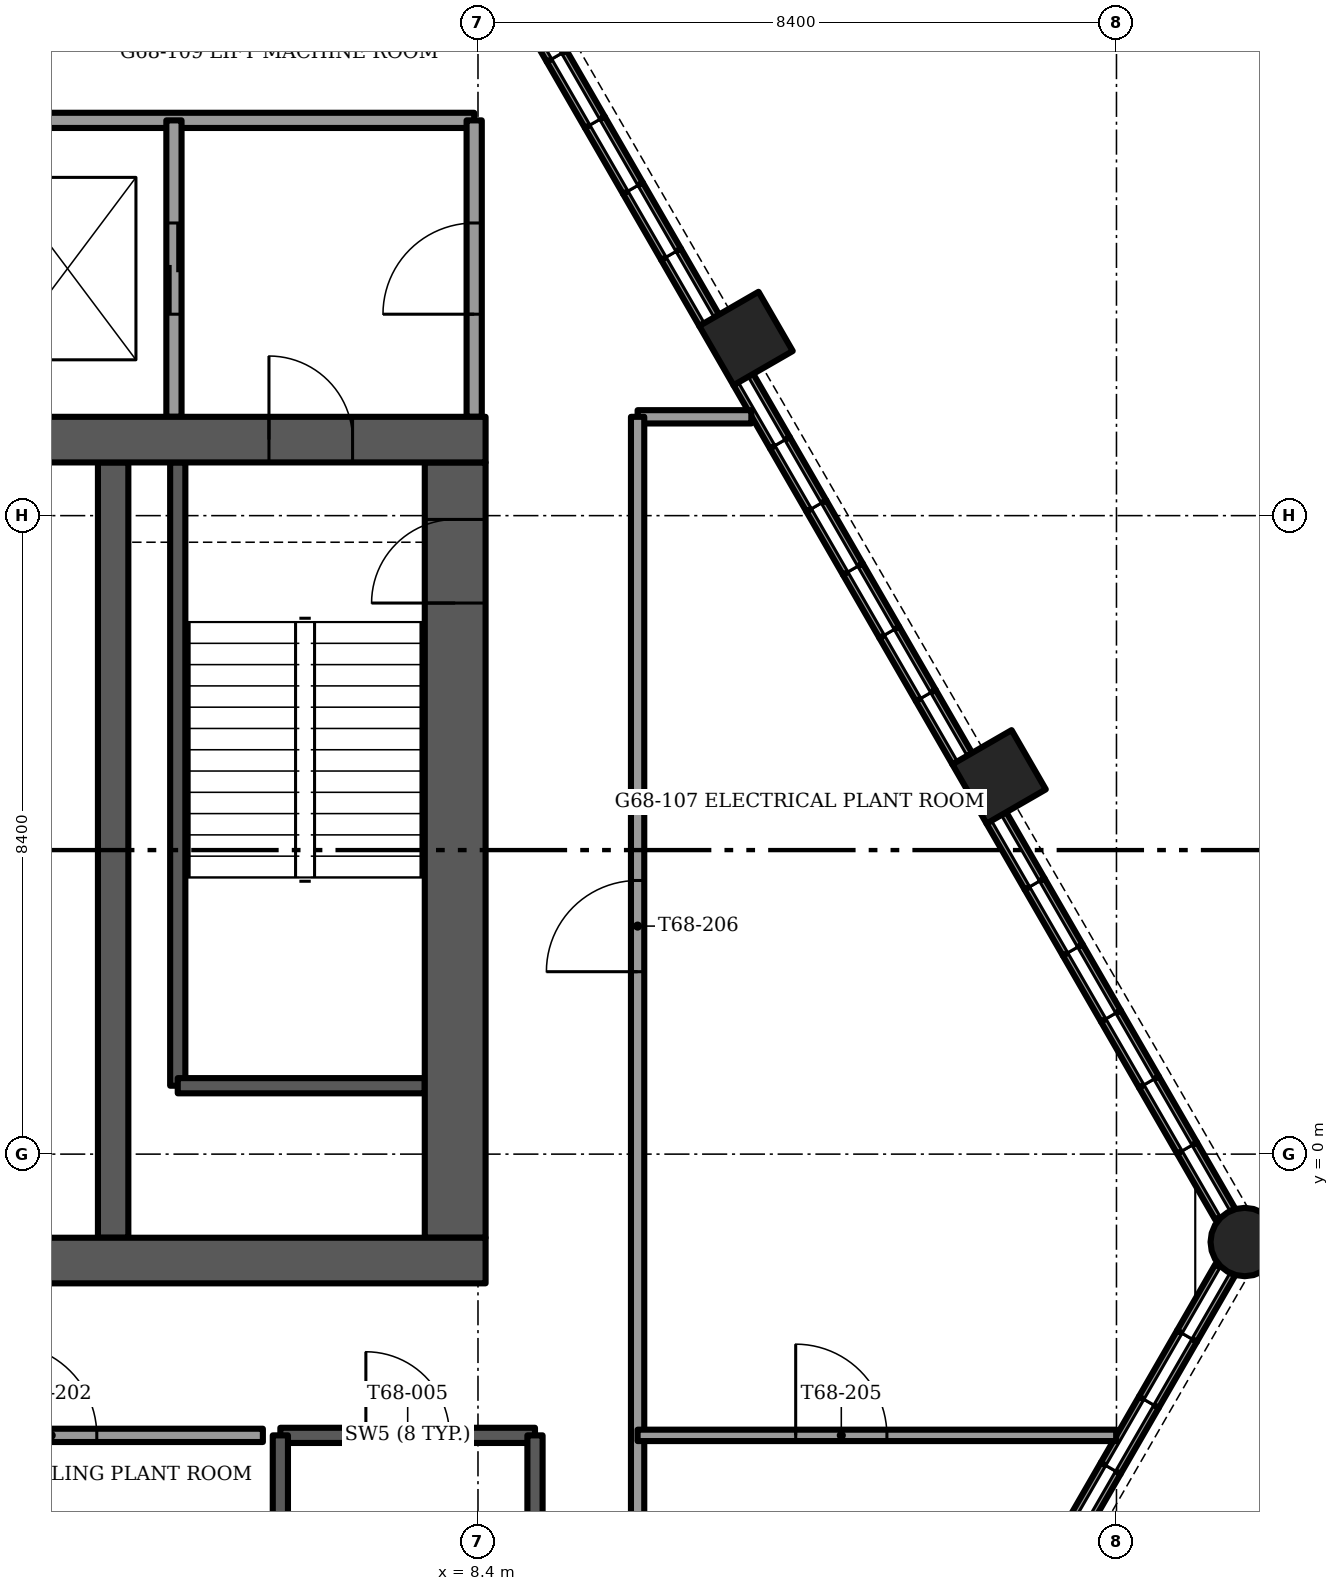
"""IFC4 building model, lengths in metres.
Left out: names, types, materials, properties, quantities, classifications, styles, units other than length and angle.
Written with IfcOpenShell. Run it as: python <this file> out.ifc"""

import sys

from ifc_helpers import new_model, si_unit, direction, frame, frame_2d, origin, origin_2d, place, context, subcontext, project, spatial, rectangle, circle, extrude, element, fill, save


model = new_model("IFC4")
c1 = context("Model", 3, precision=1e-05, world=origin(), true_north=direction((0.0, 1.0)))
c2 = subcontext(c1, "Body", "Model", "MODEL_VIEW")
j1 = project(units=[si_unit("LENGTHUNIT", "METRE"), si_unit("PLANEANGLEUNIT", "RADIAN")], contexts=[c1])
p1 = place(None, origin())
s1 = spatial("IfcSite", under=j1, at=p1, CompositionType="ELEMENT")
p2 = place(p1, origin())
s2 = spatial("IfcBuilding", under=s1, at=p2, CompositionType="ELEMENT")
p3 = place(p2, frame((0.0, 0.0, 275.0)))
s3 = spatial("IfcBuildingStorey", under=s2, at=p3, CompositionType="ELEMENT", Elevation=275.0)
p4 = place(p3, frame((-8.5, -1.4, -0.3), z_axis=(0.0, 0.0, 1.0), x_axis=(1.0, 0.0, 0.0)))
e1 = element("IfcWall", 1, at=p4, inside=s3, PredefinedType="SHEAR", context=c2, shape_type="SweptSolid", body=[
    extrude(rectangle(XDim=17.0, YDim=0.6, at=frame_2d((8.5, 0.0))), origin(), (0.0, 0.0, 1.0), 4.5),
])
p5 = place(p3, frame((-8.5, 9.4, -0.3), z_axis=(0.0, 0.0, 1.0), x_axis=(1.0, 0.0, 0.0)))
e2 = element("IfcWall", 2, at=p5, inside=s3, PredefinedType="SHEAR", context=c2, shape_type="SweptSolid", body=[
    extrude(rectangle(XDim=17.0, YDim=0.6, at=frame_2d((8.5, 0.0))), origin(), (0.0, 0.0, 1.0), 4.5),
])
p6 = place(p5, frame((1.75, 0.0, 0.0)))
e3 = element("IfcOpeningElement", 3, at=p6, cuts=e2, PredefinedType="OPENING", context=c2, shape_type="SweptSolid", body=[
    extrude(rectangle(XDim=1.1, YDim=2.1, at=frame_2d((0.55, 1.05))), frame((0.0, 0.3, 0.0), z_axis=(0.0, -1.0, 0.0), x_axis=(1.0, 0.0, 0.0)), (0.0, 0.0, 1.0), 0.6),
])
p7 = place(p5, frame((14.15, 0.0, 0.0)))
e4 = element("IfcOpeningElement", 4, at=p7, cuts=e2, PredefinedType="OPENING", context=c2, shape_type="SweptSolid", body=[
    extrude(rectangle(XDim=1.1, YDim=2.1, at=frame_2d((0.55, 1.05))), frame((0.0, 0.3, 0.0), z_axis=(0.0, -1.0, 0.0), x_axis=(1.0, 0.0, 0.0)), (0.0, 0.0, 1.0), 0.6),
])
p8 = place(p3, frame((8.1, -1.1, -0.3), z_axis=(0.0, 0.0, 1.0), x_axis=(0.0, 1.0, 0.0)))
e5 = element("IfcWall", 5, at=p8, inside=s3, PredefinedType="SHEAR", context=c2, shape_type="SweptSolid", body=[
    extrude(rectangle(XDim=10.2, YDim=0.8, at=frame_2d((5.1, 0.0))), origin(), (0.0, 0.0, 1.0), 4.5),
])
p9 = place(p8, frame((8.35, 0.0, 0.0)))
e6 = element("IfcOpeningElement", 6, at=p9, cuts=e5, PredefinedType="OPENING", context=c2, shape_type="SweptSolid", body=[
    extrude(rectangle(XDim=1.1, YDim=2.1, at=frame_2d((0.55, 1.05))), frame((0.0, 0.4, 0.0), z_axis=(0.0, -1.0, 0.0), x_axis=(1.0, 0.0, 0.0)), (0.0, 0.0, 1.0), 0.8),
])
p10 = place(p3, frame((3.6, -1.1, -0.3), z_axis=(0.0, 0.0, 1.0), x_axis=(0.0, 1.0, 0.0)))
e7 = element("IfcWall", 7, at=p10, inside=s3, PredefinedType="SHEAR", context=c2, shape_type="SweptSolid", body=[
    extrude(rectangle(XDim=10.2, YDim=0.4, at=frame_2d((5.1, 0.0))), origin(), (0.0, 0.0, 1.0), 4.5),
])
p11 = place(p3, frame((18.487, -1.156, -1.2), z_axis=(0.0, 0.0, 1.0), x_axis=(1.0, 0.0, 0.0)))
e8 = element("IfcColumn", 8, at=p11, inside=s3, PredefinedType="COLUMN", context=c2, shape_type="SweptSolid", body=[
    extrude(circle(Radius=0.45, at=origin_2d()), origin(), (0.0, 0.0, 1.0), 4.5),
])
for number, where, z_axis, x_axis in (
    (9, (15.256, 4.963, -1.2), (0.0, 0.0, 1.0), (0.5, -0.866, 0.0)),
    (10, (11.926, 10.73, -1.2), (0.0, 0.0, 1.0), (0.5, -0.866, 0.0)),
):
    element("IfcColumn", number, at=place(p3, frame(where, z_axis=z_axis, x_axis=x_axis)), inside=s3, PredefinedType="COLUMN", context=c2, shape_type="SweptSolid", body=[
        extrude(rectangle(XDim=0.9, YDim=0.9, at=origin_2d()), origin(), (0.0, 0.0, 1.0), 4.5),
    ])
p12 = place(p3, frame((16.222, -5.002, 0.0), z_axis=(0.0, 0.0, 1.0), x_axis=(0.500115484592, 0.865958718457, 0.0)))
e11 = element("IfcWall", 11, at=p12, inside=s3, PredefinedType="SOLIDWALL", context=c2, shape_type="SweptSolid", body=[
    extrude(rectangle(XDim=1.004, YDim=0.3, at=frame_2d((0.502, 0.0))), origin(), (0.0, 0.0, 1.0), 1.0),
])
p13 = place(p3, frame((16.724, -4.133, 0.0), z_axis=(0.0, 0.0, 1.0), x_axis=(0.499904868165, 0.866080321209, 0.0)))
e12 = element("IfcWall", 12, at=p13, inside=s3, PredefinedType="SOLIDWALL", context=c2, shape_type="SweptSolid", body=[
    extrude(rectangle(XDim=1.004, YDim=0.3, at=frame_2d((0.502, 0.0))), origin(), (0.0, 0.0, 1.0), 1.0),
])
p14 = place(p3, frame((17.226, -3.263, 0.0), z_axis=(0.0, 0.0, 1.0), x_axis=(0.499933044277, 0.866064057238, 0.0)))
e13 = element("IfcWall", 13, at=p14, inside=s3, PredefinedType="SOLIDWALL", context=c2, shape_type="SweptSolid", body=[
    extrude(rectangle(XDim=1.004, YDim=0.3, at=frame_2d((0.502, 0.0))), origin(), (0.0, 0.0, 1.0), 1.0),
])
p15 = place(p3, frame((17.728, -2.394, 0.0), z_axis=(0.0, 0.0, 1.0), x_axis=(0.500010157896, 0.866019539041, 0.0)))
e14 = element("IfcWall", 14, at=p15, inside=s3, PredefinedType="SOLIDWALL", context=c2, shape_type="SweptSolid", body=[
    extrude(rectangle(XDim=1.004, YDim=0.3, at=frame_2d((0.502, 0.0))), origin(), (0.0, 0.0, 1.0), 1.0),
])
for number, where, z_axis, x_axis in (
    (15, (18.23, -0.788, 0.0), (0.0, 0.0, 1.0), (-0.5, 0.866, 0.0)),
    (16, (17.729, 0.08, 0.0), (0.0, 0.0, 1.0), (-0.5, 0.866, 0.0)),
    (17, (17.227, 0.949, 0.0), (0.0, 0.0, 1.0), (-0.5, 0.866, 0.0)),
    (18, (16.726, 1.818, 0.0), (0.0, 0.0, 1.0), (-0.5, 0.866, 0.0)),
):
    element("IfcWall", number, at=place(p3, frame(where, z_axis=z_axis, x_axis=x_axis)), inside=s3, PredefinedType="SOLIDWALL", context=c2, shape_type="SweptSolid", body=[
        extrude(rectangle(XDim=1.003, YDim=0.3, at=frame_2d((0.501, 0.0))), origin(), (0.0, 0.0, 1.0), 1.0),
    ])
p16 = place(p3, frame((16.224, 2.686, 0.0), z_axis=(0.0, 0.0, 1.0), x_axis=(-0.500143783026, 0.865942374699, 0.0)))
e19 = element("IfcWall", 19, at=p16, inside=s3, PredefinedType="SOLIDWALL", context=c2, shape_type="SweptSolid", body=[
    extrude(rectangle(XDim=1.003, YDim=0.3, at=frame_2d((0.501, 0.0))), origin(), (0.0, 0.0, 1.0), 1.0),
])
p17 = place(p3, frame((15.722, 3.555, 0.0), z_axis=(0.0, 0.0, 1.0), x_axis=(-0.499961250474, 0.866047774678, 0.0)))
e20 = element("IfcWall", 20, at=p17, inside=s3, PredefinedType="SOLIDWALL", context=c2, shape_type="SweptSolid", body=[
    extrude(rectangle(XDim=1.003, YDim=0.3, at=frame_2d((0.501, 0.0))), origin(), (0.0, 0.0, 1.0), 1.0),
])
p18 = place(p3, frame((14.771, 5.203, 0.0), z_axis=(0.0, 0.0, 1.0), x_axis=(-0.500133489192, 0.865948320045, 0.0)))
e21 = element("IfcWall", 21, at=p18, inside=s3, PredefinedType="SOLIDWALL", context=c2, shape_type="SweptSolid", body=[
    extrude(rectangle(XDim=0.96, YDim=0.3, at=frame_2d((0.48, 0.0))), origin(), (0.0, 0.0, 1.0), 1.0),
])
p19 = place(p3, frame((14.291, 6.034, 0.0), z_axis=(0.0, 0.0, 1.0), x_axis=(-0.500023335103, 0.866011930837, 0.0)))
e22 = element("IfcWall", 22, at=p19, inside=s3, PredefinedType="SOLIDWALL", context=c2, shape_type="SweptSolid", body=[
    extrude(rectangle(XDim=0.96, YDim=0.3, at=frame_2d((0.48, 0.0))), origin(), (0.0, 0.0, 1.0), 1.0),
])
p20 = place(p3, frame((13.811, 6.865, 0.0), z_axis=(0.0, 0.0, 1.0), x_axis=(-0.499832553123, 0.866122057702, 0.0)))
e23 = element("IfcWall", 23, at=p20, inside=s3, PredefinedType="SOLIDWALL", context=c2, shape_type="SweptSolid", body=[
    extrude(rectangle(XDim=0.96, YDim=0.3, at=frame_2d((0.48, 0.0))), origin(), (0.0, 0.0, 1.0), 1.0),
])
p21 = place(p3, frame((13.331, 7.697, 0.0), z_axis=(0.0, 0.0, 1.0), x_axis=(-0.500023335103, 0.866011930837, 0.0)))
e24 = element("IfcWall", 24, at=p21, inside=s3, PredefinedType="SOLIDWALL", context=c2, shape_type="SweptSolid", body=[
    extrude(rectangle(XDim=0.96, YDim=0.3, at=frame_2d((0.48, 0.0))), origin(), (0.0, 0.0, 1.0), 1.0),
])
for number, where, z_axis, x_axis in (
    (25, (12.851, 8.528, 0.0), (0.0, 0.0, 1.0), (-0.5, 0.866, 0.0)),
    (26, (12.371, 9.359, 0.0), (0.0, 0.0, 1.0), (-0.5, 0.866, 0.0)),
):
    element("IfcWall", number, at=place(p3, frame(where, z_axis=z_axis, x_axis=x_axis)), inside=s3, PredefinedType="SOLIDWALL", context=c2, shape_type="SweptSolid", body=[
        extrude(rectangle(XDim=0.96, YDim=0.3, at=frame_2d((0.48, 0.0))), origin(), (0.0, 0.0, 1.0), 1.0),
    ])
for number, where, z_axis, x_axis in (
    (27, (11.441, 10.97, 0.0), (0.0, 0.0, 1.0), (-0.5, 0.866, 0.0)),
    (28, (10.94, 11.839, 0.0), (0.0, 0.0, 1.0), (-0.5, 0.866, 0.0)),
    (29, (10.438, 12.707, 0.0), (0.0, 0.0, 1.0), (-0.5, 0.866, 0.0)),
):
    element("IfcWall", number, at=place(p3, frame(where, z_axis=z_axis, x_axis=x_axis)), inside=s3, PredefinedType="SOLIDWALL", context=c2, shape_type="SweptSolid", body=[
        extrude(rectangle(XDim=1.003, YDim=0.3, at=frame_2d((0.501, 0.0))), origin(), (0.0, 0.0, 1.0), 1.0),
    ])
p22 = place(p3, frame((9.937, 13.576, 0.0), z_axis=(0.0, 0.0, 1.0), x_axis=(-0.499961250474, 0.866047774678, 0.0)))
e30 = element("IfcWall", 30, at=p22, inside=s3, PredefinedType="SOLIDWALL", context=c2, shape_type="SweptSolid", body=[
    extrude(rectangle(XDim=1.003, YDim=0.3, at=frame_2d((0.501, 0.0))), origin(), (0.0, 0.0, 1.0), 1.0),
])
p23 = place(p3, frame((9.435, 14.445, 0.0), z_axis=(0.0, 0.0, 1.0), x_axis=(-0.500038395149, 0.8660032352, 0.0)))
e31 = element("IfcWall", 31, at=p23, inside=s3, PredefinedType="SOLIDWALL", context=c2, shape_type="SweptSolid", body=[
    extrude(rectangle(XDim=1.003, YDim=0.3, at=frame_2d((0.502, 0.0))), origin(), (0.0, 0.0, 1.0), 1.0),
])
p24 = place(p3, frame((-10.5, -3.7, 0.0), z_axis=(0.0, 0.0, 1.0), x_axis=(1.0, 0.0, 0.0)))
e32 = element("IfcWall", 32, at=p24, inside=s3, PredefinedType="PARTITIONING", context=c2, shape_type="SweptSolid", body=[
    extrude(rectangle(XDim=16.07, YDim=0.175, at=frame_2d((8.035, 0.0))), origin(), (0.0, 0.0, 1.0), 4.2),
])
p25 = place(p24, frame((1.4, 0.0, 0.0)))
e33 = element("IfcOpeningElement", 33, at=p25, cuts=e32, PredefinedType="OPENING", context=c2, shape_type="SweptSolid", body=[
    extrude(rectangle(XDim=1.2, YDim=2.1, at=frame_2d((0.6, 1.05))), frame((0.0, 0.087, 0.0), z_axis=(0.0, -1.0, 0.0), x_axis=(1.0, 0.0, 0.0)), (0.0, 0.0, 1.0), 0.175),
])
p26 = place(p24, frame((6.65, 0.0, 0.0)))
e34 = element("IfcOpeningElement", 34, at=p26, cuts=e32, PredefinedType="OPENING", context=c2, shape_type="SweptSolid", body=[
    extrude(rectangle(XDim=1.2, YDim=2.1, at=frame_2d((0.6, 1.05))), frame((0.0, 0.087, 0.0), z_axis=(0.0, -1.0, 0.0), x_axis=(1.0, 0.0, 0.0)), (0.0, 0.0, 1.0), 0.175),
])
p27 = place(p24, frame((12.685, 0.0, 0.0)))
e35 = element("IfcOpeningElement", 35, at=p27, cuts=e32, PredefinedType="OPENING", context=c2, shape_type="SweptSolid", body=[
    extrude(rectangle(XDim=1.2, YDim=2.1, at=frame_2d((0.6, 1.05))), frame((0.0, 0.087, 0.0), z_axis=(0.0, -1.0, 0.0), x_axis=(1.0, 0.0, 0.0)), (0.0, 0.0, 1.0), 0.175),
])
p28 = place(p3, frame((10.5, 9.7, 0.0), z_axis=(0.0, 0.0, 1.0), x_axis=(1.0, 0.0, 0.0)))
e36 = element("IfcWall", 36, at=p28, inside=s3, PredefinedType="PARTITIONING", context=c2, shape_type="SweptSolid", body=[
    extrude(rectangle(XDim=1.496, YDim=0.175, at=frame_2d((0.748, 0.0))), origin(), (0.0, 0.0, 1.0), 4.2),
])
p29 = place(p3, frame((10.5, -11.454, 0.0), z_axis=(0.0, 0.0, 1.0), x_axis=(0.0, 1.0, 0.0)))
e37 = element("IfcWall", 37, at=p29, inside=s3, PredefinedType="PARTITIONING", context=c2, shape_type="SweptSolid", body=[
    extrude(rectangle(XDim=21.154, YDim=0.175, at=frame_2d((10.577, 0.0))), origin(), (0.0, 0.0, 1.0), 4.067),
])
p30 = place(p29, frame((13.854, 0.0, 0.0)))
e38 = element("IfcOpeningElement", 38, at=p30, cuts=e37, PredefinedType="OPENING", context=c2, shape_type="SweptSolid", body=[
    extrude(rectangle(XDim=1.2, YDim=2.1, at=frame_2d((0.6, 1.05))), frame((0.0, 0.087, 0.0), z_axis=(0.0, -1.0, 0.0), x_axis=(1.0, 0.0, 0.0)), (0.0, 0.0, 1.0), 0.175),
])
p31 = place(p3, frame((10.5, -3.7, 0.0), z_axis=(0.0, 0.0, 1.0), x_axis=(1.0, 0.0, 0.0)))
e39 = element("IfcWall", 39, at=p31, inside=s3, PredefinedType="PARTITIONING", context=c2, shape_type="SweptSolid", body=[
    extrude(rectangle(XDim=6.296, YDim=0.15, at=frame_2d((3.148, 0.0))), origin(), (0.0, 0.0, 1.0), 4.2),
])
p32 = place(p31, frame((2.08, 0.0, 0.0)))
e40 = element("IfcOpeningElement", 40, at=p32, cuts=e39, PredefinedType="OPENING", context=c2, shape_type="SweptSolid", body=[
    extrude(rectangle(XDim=1.2, YDim=2.1, at=frame_2d((0.6, 1.05))), frame((0.0, 0.075, 0.0), z_axis=(0.0, -1.0, 0.0), x_axis=(1.0, 0.0, 0.0)), (0.0, 0.0, 1.0), 0.15),
])
p33 = place(p3, frame((4.45, 0.9, -0.3), z_axis=(0.0, 0.0, 1.0), x_axis=(0.0, 1.0, 0.0)))
e41 = element("IfcWall", 41, at=p33, inside=s3, PredefinedType="SOLIDWALL", context=c2, shape_type="SweptSolid", body=[
    extrude(rectangle(XDim=8.2, YDim=0.2, at=frame_2d((4.1, 0.0))), origin(), (0.0, 0.0, 1.0), 4.5),
])
p34 = place(p3, frame((4.45, 0.9, -0.3), z_axis=(0.0, 0.0, 1.0), x_axis=(1.0, 0.0, 0.0)))
e42 = element("IfcWall", 42, at=p34, inside=s3, PredefinedType="SOLIDWALL", context=c2, shape_type="SweptSolid", body=[
    extrude(rectangle(XDim=3.25, YDim=0.2, at=frame_2d((1.625, 0.0))), origin(), (0.0, 0.0, 1.0), 4.5),
])
p35 = place(p3, frame((5.8, -3.7, -0.3), z_axis=(0.0, 0.0, 1.0), x_axis=(1.0, 0.0, 0.0)))
e43 = element("IfcWall", 43, at=p35, inside=s3, PredefinedType="SOLIDWALL", context=c2, shape_type="SweptSolid", body=[
    extrude(rectangle(XDim=3.35, YDim=0.2, at=frame_2d((1.675, 0.0))), origin(), (0.0, 0.0, 1.0), 4.5),
])
p36 = place(p35, frame((1.125, 0.0, 0.0)))
e44 = element("IfcOpeningElement", 44, at=p36, cuts=e43, PredefinedType="OPENING", context=c2, shape_type="SweptSolid", body=[
    extrude(rectangle(XDim=1.1, YDim=2.1, at=frame_2d((0.55, 1.05))), frame((0.0, 0.1, 0.0), z_axis=(0.0, -1.0, 0.0), x_axis=(1.0, 0.0, 0.0)), (0.0, 0.0, 1.0), 0.2),
])
for number, where, z_axis, x_axis in (
    (45, (5.8, -3.7, -0.3), (0.0, 0.0, 1.0), (0.0, -1.0, 0.0)),
    (46, (9.15, -3.7, -0.3), (0.0, 0.0, 1.0), (0.0, -1.0, 0.0)),
):
    element("IfcWall", number, at=place(p3, frame(where, z_axis=z_axis, x_axis=x_axis)), inside=s3, PredefinedType="SOLIDWALL", context=c2, shape_type="SweptSolid", body=[
        extrude(rectangle(XDim=7.7, YDim=0.2, at=frame_2d((3.85, 0.0))), origin(), (0.0, 0.0, 1.0), 4.5),
    ])
p37 = place(p3, frame((-8.35, 13.6, 0.0), z_axis=(0.0, 0.0, 1.0), x_axis=(1.0, 0.0, 0.0)))
e47 = element("IfcWall", 47, at=p37, inside=s3, PredefinedType="PARTITIONING", context=c2, shape_type="SweptSolid", body=[
    extrude(rectangle(XDim=16.7, YDim=0.2, at=frame_2d((8.35, 0.0))), origin(), (0.0, 0.0, 1.0), 4.2),
])
p38 = place(p3, frame((8.35, 9.7, 0.0), z_axis=(0.0, 0.0, 1.0), x_axis=(0.0, 1.0, 0.0)))
e48 = element("IfcWall", 48, at=p38, inside=s3, PredefinedType="PARTITIONING", context=c2, shape_type="SweptSolid", body=[
    extrude(rectangle(XDim=3.9, YDim=0.2, at=frame_2d((1.95, 0.0))), origin(), (0.0, 0.0, 1.0), 4.2),
])
p39 = place(p38, frame((1.35, 0.0, 0.0)))
e49 = element("IfcOpeningElement", 49, at=p39, cuts=e48, PredefinedType="OPENING", context=c2, shape_type="SweptSolid", body=[
    extrude(rectangle(XDim=1.2, YDim=2.1, at=frame_2d((0.6, 1.05))), frame((0.0, 0.1, 0.0), z_axis=(0.0, -1.0, 0.0), x_axis=(1.0, 0.0, 0.0)), (0.0, 0.0, 1.0), 0.2),
])
p40 = place(p3, frame((4.4, 9.7, 0.0), z_axis=(0.0, 0.0, 1.0), x_axis=(0.0, 1.0, 0.0)))
e50 = element("IfcWall", 50, at=p40, inside=s3, PredefinedType="PARTITIONING", context=c2, shape_type="SweptSolid", body=[
    extrude(rectangle(XDim=3.9, YDim=0.2, at=frame_2d((1.95, 0.0))), origin(), (0.0, 0.0, 1.0), 4.2),
])
p41 = place(p40, frame((1.35, 0.0, 0.0)))
e51 = element("IfcOpeningElement", 51, at=p41, cuts=e50, PredefinedType="OPENING", context=c2, shape_type="SweptSolid", body=[
    extrude(rectangle(XDim=1.2, YDim=2.1, at=frame_2d((0.6, 1.05))), frame((0.0, 0.1, 0.0), z_axis=(0.0, -1.0, 0.0), x_axis=(1.0, 0.0, 0.0)), (0.0, 0.0, 1.0), 0.2),
])
p42 = place(p27, origin())
e52 = element("IfcDoor", 52, at=p42, inside=s3, OperationType="SINGLE_SWING_RIGHT", PredefinedType="DOOR", context=c2, shape_type="SweptSolid", body=[
    extrude(rectangle(XDim=1.2, YDim=2.1, at=frame_2d((0.6, 1.05))), frame((0.0, 0.025, 0.0), z_axis=(0.0, -1.0, 0.0), x_axis=(1.0, 0.0, 0.0)), (0.0, 0.0, 1.0), 0.05),
])
fill(e35, e52)
p43 = place(p32, origin())
e53 = element("IfcDoor", 53, at=p43, inside=s3, OperationType="SINGLE_SWING_LEFT", PredefinedType="DOOR", context=c2, shape_type="SweptSolid", body=[
    extrude(rectangle(XDim=1.2, YDim=2.1, at=frame_2d((0.6, 1.05))), frame((0.0, 0.025, 0.0), z_axis=(0.0, -1.0, 0.0), x_axis=(1.0, 0.0, 0.0)), (0.0, 0.0, 1.0), 0.05),
])
fill(e40, e53)
p44 = place(p30, origin())
e54 = element("IfcDoor", 54, at=p44, inside=s3, OperationType="SINGLE_SWING_RIGHT", PredefinedType="DOOR", context=c2, shape_type="SweptSolid", body=[
    extrude(rectangle(XDim=1.2, YDim=2.1, at=frame_2d((0.6, 1.05))), frame((0.0, 0.025, 0.0), z_axis=(0.0, -1.0, 0.0), x_axis=(1.0, 0.0, 0.0)), (0.0, 0.0, 1.0), 0.05),
])
fill(e38, e54)
p45 = place(p7, origin())
e55 = element("IfcDoor", 55, at=p45, inside=s3, OperationType="SINGLE_SWING_RIGHT", PredefinedType="DOOR", context=c2, shape_type="SweptSolid", body=[
    extrude(rectangle(XDim=1.1, YDim=2.1, at=frame_2d((0.55, 1.05))), frame((0.0, 0.025, 0.0), z_axis=(0.0, -1.0, 0.0), x_axis=(1.0, 0.0, 0.0)), (0.0, 0.0, 1.0), 0.05),
])
fill(e4, e55)
p46 = place(p9, origin())
e56 = element("IfcDoor", 56, at=p46, inside=s3, OperationType="SINGLE_SWING_LEFT", PredefinedType="DOOR", context=c2, shape_type="SweptSolid", body=[
    extrude(rectangle(XDim=1.1, YDim=2.1, at=frame_2d((0.55, 1.05))), frame((0.0, 0.025, 0.0), z_axis=(0.0, -1.0, 0.0), x_axis=(1.0, 0.0, 0.0)), (0.0, 0.0, 1.0), 0.05),
])
fill(e6, e56)
p47 = place(p36, origin())
e57 = element("IfcDoor", 57, at=p47, inside=s3, OperationType="SINGLE_SWING_LEFT", PredefinedType="DOOR", context=c2, shape_type="SweptSolid", body=[
    extrude(rectangle(XDim=1.1, YDim=2.1, at=frame_2d((0.55, 1.05))), frame((0.0, 0.025, 0.0), z_axis=(0.0, -1.0, 0.0), x_axis=(1.0, 0.0, 0.0)), (0.0, 0.0, 1.0), 0.05),
])
fill(e44, e57)
p48 = place(p41, origin())
e58 = element("IfcDoor", 58, at=p48, inside=s3, OperationType="SLIDING_TO_LEFT", PredefinedType="DOOR", context=c2, shape_type="SweptSolid", body=[
    extrude(rectangle(XDim=1.2, YDim=2.1, at=frame_2d((0.6, 1.05))), frame((0.0, 0.025, 0.0), z_axis=(0.0, -1.0, 0.0), x_axis=(1.0, 0.0, 0.0)), (0.0, 0.0, 1.0), 0.05),
])
fill(e51, e58)
p49 = place(p39, origin())
e59 = element("IfcDoor", 59, at=p49, inside=s3, OperationType="SINGLE_SWING_LEFT", PredefinedType="DOOR", context=c2, shape_type="SweptSolid", body=[
    extrude(rectangle(XDim=1.2, YDim=2.1, at=frame_2d((0.6, 1.05))), frame((0.0, 0.025, 0.0), z_axis=(0.0, -1.0, 0.0), x_axis=(1.0, 0.0, 0.0)), (0.0, 0.0, 1.0), 0.05),
])
fill(e49, e59)
save(model, sys.argv[1])
